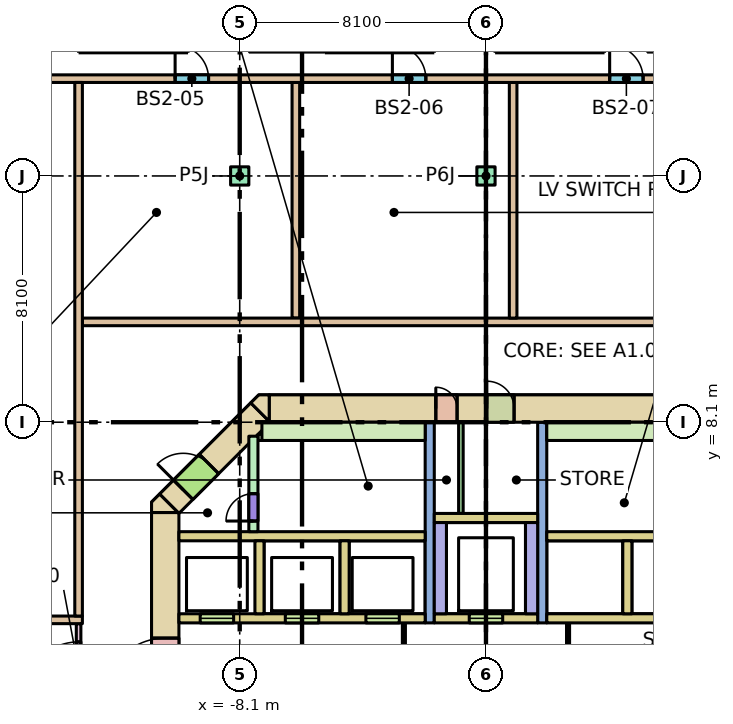
"""IFC4 building model, lengths in metres.
Left out: names, types, materials, properties, quantities, classifications, styles, units other than length and angle.
Written with IfcOpenShell. Run it as: python <this file> out.ifc"""

import sys

from ifc_helpers import new_model, si_unit, direction, frame, frame_2d, origin, origin_2d, place, context, subcontext, project, spatial, polyline, rectangle, outline, extrude, element, fill, save


model = new_model("IFC4")
c1 = context("Model", 3, precision=1e-05, world=origin(), true_north=direction((0.0, 1.0)))
c2 = subcontext(c1, "Body", "Model", "MODEL_VIEW")
j1 = project(units=[si_unit("LENGTHUNIT", "METRE"), si_unit("PLANEANGLEUNIT", "RADIAN")], contexts=[c1])
p1 = place(None, origin())
s1 = spatial("IfcSite", under=j1, at=p1, CompositionType="ELEMENT")
p2 = place(p1, origin())
s2 = spatial("IfcBuilding", under=s1, at=p2, CompositionType="ELEMENT")
p3 = place(p2, frame((0.0, 0.0, -7.2)))
s3 = spatial("IfcBuildingStorey", under=s2, at=p3, CompositionType="ELEMENT", Elevation=-7.2)
for number, where, z_axis, x_axis in (
    (1, (-8.1, 16.2, 0.0), (0.0, 0.0, 1.0), (1.0, 0.0, 0.0)),
    (2, (0.0, 16.2, 0.0), (0.0, 0.0, 1.0), (1.0, 0.0, 0.0)),
):
    element("IfcColumn", number, at=place(p3, frame(where, z_axis=z_axis, x_axis=x_axis)), inside=s3, PredefinedType="COLUMN", context=c2, shape_type="SweptSolid", body=[
        extrude(rectangle(XDim=0.6, YDim=0.6, at=origin_2d()), origin(), (0.0, 0.0, 1.0), 3.6),
    ])
p4 = place(p3, frame((-7.13, 8.55, -0.32), z_axis=(0.0, 0.0, 1.0), x_axis=(1.0, 0.0, 0.0)))
e3 = element("IfcWall", 3, at=p4, inside=s3, PredefinedType="SHEAR", context=c2, shape_type="SweptSolid", body=[
    extrude(rectangle(XDim=14.26, YDim=0.9, at=frame_2d((7.13, 0.0))), origin(), (0.0, 0.0, 1.0), 3.6),
])
p5 = place(p4, frame((5.48, 0.0, 0.32)))
e4 = element("IfcOpeningElement", 4, at=p5, cuts=e3, PredefinedType="OPENING", context=c2, shape_type="SweptSolid", body=[
    extrude(rectangle(XDim=0.7, YDim=2.1, at=frame_2d((0.35, 1.05))), frame((0.0, 0.46, 0.0), z_axis=(0.0, -1.0, 0.0), x_axis=(1.0, 0.0, 0.0)), (0.0, 0.0, 1.0), 0.92),
])
p6 = place(p4, frame((7.155, 0.0, 0.32)))
e5 = element("IfcOpeningElement", 5, at=p6, cuts=e3, PredefinedType="OPENING", context=c2, shape_type="SweptSolid", body=[
    extrude(rectangle(XDim=0.9, YDim=2.1, at=frame_2d((0.45, 1.05))), frame((0.0, 0.46, 0.0), z_axis=(0.0, -1.0, 0.0), x_axis=(1.0, 0.0, 0.0)), (0.0, 0.0, 1.0), 0.92),
])
p7 = place(p3, frame((-10.55, -5.13, -0.32), z_axis=(0.0, 0.0, 1.0), x_axis=(0.0, 1.0, 0.0)))
e6 = element("IfcWall", 6, at=p7, inside=s3, PredefinedType="SHEAR", context=c2, shape_type="SweptSolid", body=[
    extrude(rectangle(XDim=10.26, YDim=0.9, at=frame_2d((5.13, 0.0))), origin(), (0.0, 0.0, 1.0), 3.6),
])
p8 = place(p7, frame((4.13, 0.0, 0.32)))
e7 = element("IfcOpeningElement", 7, at=p8, cuts=e6, PredefinedType="OPENING", context=c2, shape_type="SweptSolid", body=[
    extrude(rectangle(XDim=2.0, YDim=2.1, at=frame_2d((1.0, 1.05))), frame((0.0, 0.46, 0.0), z_axis=(0.0, -1.0, 0.0), x_axis=(1.0, 0.0, 0.0)), (0.0, 0.0, 1.0), 0.92),
])
p9 = place(p3, frame((-10.418, 5.418, -0.32), z_axis=(0.0, 0.0, 1.0), x_axis=(0.707106781187, 0.707106781187, 0.0)))
e8 = element("IfcWall", 8, at=p9, inside=s3, PredefinedType="SHEAR", context=c2, shape_type="SweptSolid", body=[
    extrude(rectangle(XDim=4.243, YDim=0.9, at=frame_2d((2.121, 0.0))), origin(), (0.0, 0.0, 1.0), 3.6),
])
p10 = place(p9, frame((0.65, 0.0, 0.32)))
e9 = element("IfcOpeningElement", 9, at=p10, cuts=e8, PredefinedType="OPENING", context=c2, shape_type="SweptSolid", body=[
    extrude(rectangle(XDim=1.2, YDim=2.1, at=frame_2d((0.6, 1.05))), frame((0.0, 0.46, 0.0), z_axis=(0.0, -1.0, 0.0), x_axis=(1.0, 0.0, 0.0)), (0.0, 0.0, 1.0), 0.92),
])
p11 = place(p3, frame((0.0, 0.0, -0.32)))
e10 = element("IfcWall", 10, at=p11, inside=s3, PredefinedType="SHEAR", context=c2, shape_type="SweptSolid", body=[
    extrude(outline(polyline([(-10.736, 5.736), (-10.13, 5.13), (-11.0, 5.13), (-11.0, 5.473), (-10.736, 5.736)])), origin(), (0.0, 0.0, 1.0), 3.6),
])
p12 = place(p3, frame((0.0, 0.0, -0.32)))
e11 = element("IfcWall", 11, at=p12, inside=s3, PredefinedType="SHEAR", context=c2, shape_type="SweptSolid", body=[
    extrude(outline(polyline([(-7.473, 9.0), (-7.13, 9.0), (-7.13, 8.13), (-7.736, 8.736), (-7.473, 9.0)])), origin(), (0.0, 0.0, 1.0), 3.6),
])
for number, where, z_axis, x_axis in (
    (12, (-10.1, 4.35, 0.0), (0.0, 0.0, 1.0), (1.0, 0.0, 0.0)),
    (13, (2.0, 4.35, 0.0), (0.0, 0.0, 1.0), (1.0, 0.0, 0.0)),
):
    element("IfcWall", number, at=place(p3, frame(where, z_axis=z_axis, x_axis=x_axis)), inside=s3, PredefinedType="SOLIDWALL", context=c2, shape_type="SweptSolid", body=[
        extrude(rectangle(XDim=8.1, YDim=0.3, at=frame_2d((4.05, 0.0))), origin(), (0.0, 0.0, 1.0), 3.28),
    ])
p13 = place(p3, frame((-10.1, 1.65, 0.0), z_axis=(0.0, 0.0, 1.0), x_axis=(1.0, 0.0, 0.0)))
e14 = element("IfcWall", 14, at=p13, inside=s3, PredefinedType="SOLIDWALL", context=c2, shape_type="SweptSolid", body=[
    extrude(rectangle(XDim=8.1, YDim=0.3, at=frame_2d((4.05, 0.0))), origin(), (0.0, 0.0, 1.0), 3.28),
])
p14 = place(p13, frame((0.7, 0.0, 0.0)))
e15 = element("IfcOpeningElement", 15, at=p14, cuts=e14, PredefinedType="OPENING", context=c2, shape_type="SweptSolid", body=[
    extrude(rectangle(XDim=1.1, YDim=2.1, at=frame_2d((0.55, 1.05))), frame((0.0, 0.16, 0.0), z_axis=(0.0, -1.0, 0.0), x_axis=(1.0, 0.0, 0.0)), (0.0, 0.0, 1.0), 0.32),
])
p15 = place(p13, frame((3.5, 0.0, 0.0)))
e16 = element("IfcOpeningElement", 16, at=p15, cuts=e14, PredefinedType="OPENING", context=c2, shape_type="SweptSolid", body=[
    extrude(rectangle(XDim=1.1, YDim=2.1, at=frame_2d((0.55, 1.05))), frame((0.0, 0.16, 0.0), z_axis=(0.0, -1.0, 0.0), x_axis=(1.0, 0.0, 0.0)), (0.0, 0.0, 1.0), 0.32),
])
p16 = place(p13, frame((6.15, 0.0, 0.0)))
e17 = element("IfcOpeningElement", 17, at=p16, cuts=e14, PredefinedType="OPENING", context=c2, shape_type="SweptSolid", body=[
    extrude(rectangle(XDim=1.1, YDim=2.1, at=frame_2d((0.55, 1.05))), frame((0.0, 0.16, 0.0), z_axis=(0.0, -1.0, 0.0), x_axis=(1.0, 0.0, 0.0)), (0.0, 0.0, 1.0), 0.32),
])
p17 = place(p3, frame((2.0, 1.65, 0.0), z_axis=(0.0, 0.0, 1.0), x_axis=(1.0, 0.0, 0.0)))
e18 = element("IfcWall", 18, at=p17, inside=s3, PredefinedType="SOLIDWALL", context=c2, shape_type="SweptSolid", body=[
    extrude(rectangle(XDim=8.1, YDim=0.3, at=frame_2d((4.05, 0.0))), origin(), (0.0, 0.0, 1.0), 3.28),
])
for number, where, z_axis, x_axis in (
    (19, (-7.45, 1.8, 0.0), (0.0, 0.0, 1.0), (0.0, 1.0, 0.0)),
    (20, (-4.65, 1.8, 0.0), (0.0, 0.0, 1.0), (0.0, 1.0, 0.0)),
    (21, (4.65, 1.8, 0.0), (0.0, 0.0, 1.0), (0.0, 1.0, 0.0)),
):
    element("IfcWall", number, at=place(p3, frame(where, z_axis=z_axis, x_axis=x_axis)), inside=s3, PredefinedType="SOLIDWALL", context=c2, shape_type="SweptSolid", body=[
        extrude(rectangle(XDim=2.4, YDim=0.3, at=frame_2d((1.2, 0.0))), origin(), (0.0, 0.0, 1.0), 3.28),
    ])
for number, where, z_axis, x_axis in (
    (22, (-1.85, 1.5, 0.0), (0.0, 0.0, 1.0), (0.0, 1.0, 0.0)),
    (23, (1.85, 1.5, 0.0), (0.0, 0.0, 1.0), (0.0, 1.0, 0.0)),
):
    element("IfcWall", number, at=place(p3, frame(where, z_axis=z_axis, x_axis=x_axis)), inside=s3, PredefinedType="SHEAR", context=c2, shape_type="SweptSolid", body=[
        extrude(rectangle(XDim=6.6, YDim=0.3, at=frame_2d((3.3, 0.0))), origin(), (0.0, 0.0, 1.0), 3.28),
    ])
p18 = place(p3, frame((-1.7, 1.65, 0.0), z_axis=(0.0, 0.0, 1.0), x_axis=(1.0, 0.0, 0.0)))
e24 = element("IfcWall", 24, at=p18, inside=s3, PredefinedType="SOLIDWALL", context=c2, shape_type="SweptSolid", body=[
    extrude(rectangle(XDim=3.4, YDim=0.3, at=frame_2d((1.7, 0.0))), origin(), (0.0, 0.0, 1.0), 3.28),
])
p19 = place(p18, frame((1.15, 0.0, 0.0)))
e25 = element("IfcOpeningElement", 25, at=p19, cuts=e24, PredefinedType="OPENING", context=c2, shape_type="SweptSolid", body=[
    extrude(rectangle(XDim=1.1, YDim=2.1, at=frame_2d((0.55, 1.05))), frame((0.0, 0.16, 0.0), z_axis=(0.0, -1.0, 0.0), x_axis=(1.0, 0.0, 0.0)), (0.0, 0.0, 1.0), 0.32),
])
for number, where, z_axis, x_axis in (
    (26, (-1.5, 1.8, 0.0), (0.0, 0.0, 1.0), (0.0, 1.0, 0.0)),
    (27, (1.5, 1.8, 0.0), (0.0, 0.0, 1.0), (0.0, 1.0, 0.0)),
):
    element("IfcWall", number, at=place(p3, frame(where, z_axis=z_axis, x_axis=x_axis)), inside=s3, PredefinedType="SOLIDWALL", context=c2, shape_type="SweptSolid", body=[
        extrude(rectangle(XDim=3.0, YDim=0.4, at=frame_2d((1.5, 0.0))), origin(), (0.0, 0.0, 1.0), 3.28),
    ])
p20 = place(p3, frame((-1.7, 4.95, 0.0), z_axis=(0.0, 0.0, 1.0), x_axis=(1.0, 0.0, 0.0)))
e28 = element("IfcWall", 28, at=p20, inside=s3, PredefinedType="SOLIDWALL", context=c2, shape_type="SweptSolid", body=[
    extrude(rectangle(XDim=3.4, YDim=0.3, at=frame_2d((1.7, 0.0))), origin(), (0.0, 0.0, 1.0), 3.28),
])
p21 = place(p3, frame((-7.65, 4.5, 0.0), z_axis=(0.0, 0.0, 1.0), x_axis=(0.0, 1.0, 0.0)))
e29 = element("IfcWall", 29, at=p21, inside=s3, PredefinedType="SHEAR", context=c2, shape_type="SweptSolid", body=[
    extrude(rectangle(XDim=3.14, YDim=0.3, at=frame_2d((1.57, 0.0))), origin(), (0.0, 0.0, 1.0), 3.28),
])
p22 = place(p21, frame((0.35, 0.0, 0.0)))
e30 = element("IfcOpeningElement", 30, at=p22, cuts=e29, PredefinedType="OPENING", context=c2, shape_type="SweptSolid", body=[
    extrude(rectangle(XDim=0.9, YDim=2.1, at=frame_2d((0.45, 1.05))), frame((0.0, 0.16, 0.0), z_axis=(0.0, -1.0, 0.0), x_axis=(1.0, 0.0, 0.0)), (0.0, 0.0, 1.0), 0.32),
])
for number, where, z_axis, x_axis in (
    (31, (-7.37, 7.8, 0.0), (0.0, 0.0, 1.0), (1.0, 0.0, 0.0)),
    (32, (2.0, 7.8, 0.0), (0.0, 0.0, 1.0), (1.0, 0.0, 0.0)),
):
    element("IfcWall", number, at=place(p3, frame(where, z_axis=z_axis, x_axis=x_axis)), inside=s3, PredefinedType="SHEAR", context=c2, shape_type="SweptSolid", body=[
        extrude(rectangle(XDim=5.37, YDim=0.6, at=frame_2d((2.685, 0.0))), origin(), (0.0, 0.0, 1.0), 3.28),
    ])
p23 = place(p3, frame((-7.5, 7.6, 0.0), z_axis=(0.0, 0.0, 1.0), x_axis=(1.0, 0.0, 0.0)))
e33 = element("IfcWall", 33, at=p23, inside=s3, PredefinedType="SHEAR", context=c2, shape_type="SweptSolid", body=[
    extrude(rectangle(XDim=0.6, YDim=0.2, at=frame_2d((0.3, 0.0))), origin(), (0.0, 0.0, 1.0), 3.28),
])
p24 = place(p3, frame((-2.7, -1.5, 0.0), z_axis=(0.0, 0.0, 1.0), x_axis=(0.0, 1.0, 0.0)))
e34 = element("IfcWall", 34, at=p24, inside=s3, PredefinedType="PARTITIONING", context=c2, shape_type="SweptSolid", body=[
    extrude(rectangle(XDim=3.0, YDim=0.1, at=frame_2d((1.5, 0.0))), origin(), (0.0, 0.0, 1.0), 3.28),
])
p25 = place(p24, frame((0.9, 0.0, 0.0)))
e35 = element("IfcOpeningElement", 35, at=p25, cuts=e34, PredefinedType="OPENING", context=c2, shape_type="SweptSolid", body=[
    extrude(rectangle(XDim=1.2, YDim=2.1, at=frame_2d((0.6, 1.05))), frame((0.0, 0.06, 0.0), z_axis=(0.0, -1.0, 0.0), x_axis=(1.0, 0.0, 0.0)), (0.0, 0.0, 1.0), 0.12),
])
p26 = place(p3, frame((2.7, -1.5, 0.0), z_axis=(0.0, 0.0, 1.0), x_axis=(0.0, 1.0, 0.0)))
e36 = element("IfcWall", 36, at=p26, inside=s3, PredefinedType="PARTITIONING", context=c2, shape_type="SweptSolid", body=[
    extrude(rectangle(XDim=3.0, YDim=0.1, at=frame_2d((1.5, 0.0))), origin(), (0.0, 0.0, 1.0), 3.28),
])
p27 = place(p26, frame((0.9, 0.0, 0.0)))
e37 = element("IfcOpeningElement", 37, at=p27, cuts=e36, PredefinedType="OPENING", context=c2, shape_type="SweptSolid", body=[
    extrude(rectangle(XDim=1.2, YDim=2.1, at=frame_2d((0.6, 1.05))), frame((0.0, 0.06, 0.0), z_axis=(0.0, -1.0, 0.0), x_axis=(1.0, 0.0, 0.0)), (0.0, 0.0, 1.0), 0.12),
])
p28 = place(p3, frame((-0.825, 5.1, 0.0), z_axis=(0.0, 0.0, 1.0), x_axis=(0.0, 1.0, 0.0)))
e38 = element("IfcWall", 38, at=p28, inside=s3, PredefinedType="PARTITIONING", context=c2, shape_type="SweptSolid", body=[
    extrude(rectangle(XDim=3.0, YDim=0.15, at=frame_2d((1.5, 0.0))), origin(), (0.0, 0.0, 1.0), 3.28),
])
p29 = place(p3, frame((-6.253, 11.525, 0.0), z_axis=(0.0, 0.0, 1.0), x_axis=(0.0, 1.0, 0.0)))
e39 = element("IfcWall", 39, at=p29, inside=s3, PredefinedType="PARTITIONING", context=c2, shape_type="SweptSolid", body=[
    extrude(rectangle(XDim=7.75, YDim=0.25, at=frame_2d((3.875, 0.0))), origin(), (0.0, 0.0, 1.0), 3.28),
])
p30 = place(p3, frame((-13.275, 11.4, 0.0), z_axis=(0.0, 0.0, 1.0), x_axis=(1.0, 0.0, 0.0)))
e40 = element("IfcWall", 40, at=p30, inside=s3, PredefinedType="PARTITIONING", context=c2, shape_type="SweptSolid", body=[
    extrude(rectangle(XDim=34.55, YDim=0.25, at=frame_2d((17.275, 0.0))), origin(), (0.0, 0.0, 1.0), 3.28),
])
p31 = place(p3, frame((0.893, 11.525, 0.0), z_axis=(0.0, 0.0, 1.0), x_axis=(0.0, 1.0, 0.0)))
e41 = element("IfcWall", 41, at=p31, inside=s3, PredefinedType="PARTITIONING", context=c2, shape_type="SweptSolid", body=[
    extrude(rectangle(XDim=7.75, YDim=0.25, at=frame_2d((3.875, 0.0))), origin(), (0.0, 0.0, 1.0), 3.28),
])
p32 = place(p3, frame((-17.778, 19.4, 0.0), z_axis=(0.0, 0.0, 1.0), x_axis=(1.0, 0.0, 0.0)))
e42 = element("IfcWall", 42, at=p32, inside=s3, PredefinedType="PARTITIONING", context=c2, shape_type="SweptSolid", body=[
    extrude(rectangle(XDim=35.557, YDim=0.25, at=frame_2d((17.778, 0.0))), origin(), (0.0, 0.0, 1.0), 3.28),
])
p33 = place(p32, frame((7.553, 0.0, 0.0)))
e43 = element("IfcOpeningElement", 43, at=p33, cuts=e42, PredefinedType="OPENING", context=c2, shape_type="SweptSolid", body=[
    extrude(rectangle(XDim=1.1, YDim=2.1, at=frame_2d((0.55, 1.05))), frame((0.0, 0.135, 0.0), z_axis=(0.0, -1.0, 0.0), x_axis=(1.0, 0.0, 0.0)), (0.0, 0.0, 1.0), 0.27),
])
p34 = place(p32, frame((14.7, 0.0, 0.0)))
e44 = element("IfcOpeningElement", 44, at=p34, cuts=e42, PredefinedType="OPENING", context=c2, shape_type="SweptSolid", body=[
    extrude(rectangle(XDim=1.1, YDim=2.1, at=frame_2d((0.55, 1.05))), frame((0.0, 0.135, 0.0), z_axis=(0.0, -1.0, 0.0), x_axis=(1.0, 0.0, 0.0)), (0.0, 0.0, 1.0), 0.27),
])
p35 = place(p32, frame((21.847, 0.0, 0.0)))
e45 = element("IfcOpeningElement", 45, at=p35, cuts=e42, PredefinedType="OPENING", context=c2, shape_type="SweptSolid", body=[
    extrude(rectangle(XDim=1.1, YDim=2.1, at=frame_2d((0.55, 1.05))), frame((0.0, 0.135, 0.0), z_axis=(0.0, -1.0, 0.0), x_axis=(1.0, 0.0, 0.0)), (0.0, 0.0, 1.0), 0.27),
])
p36 = place(p32, frame((30.193, 0.0, 0.0)))
e46 = element("IfcOpeningElement", 46, at=p36, cuts=e42, PredefinedType="OPENING", context=c2, shape_type="SweptSolid", body=[
    extrude(rectangle(XDim=1.1, YDim=2.1, at=frame_2d((0.55, 1.05))), frame((0.0, 0.135, 0.0), z_axis=(0.0, -1.0, 0.0), x_axis=(1.0, 0.0, 0.0)), (0.0, 0.0, 1.0), 0.27),
])
p37 = place(p3, frame((-13.4, -1.475, 0.0), z_axis=(0.0, 0.0, 1.0), x_axis=(0.0, 1.0, 0.0)))
e47 = element("IfcWall", 47, at=p37, inside=s3, PredefinedType="PARTITIONING", context=c2, shape_type="SweptSolid", body=[
    extrude(rectangle(XDim=2.95, YDim=0.15, at=frame_2d((1.475, 0.0))), origin(), (0.0, 0.0, 1.0), 3.28),
])
p38 = place(p37, frame((0.55, 0.0, 0.0)))
e48 = element("IfcOpeningElement", 48, at=p38, cuts=e47, PredefinedType="OPENING", context=c2, shape_type="SweptSolid", body=[
    extrude(rectangle(XDim=1.8, YDim=2.4, at=frame_2d((0.9, 1.2))), frame((0.0, 0.085, 0.0), z_axis=(0.0, -1.0, 0.0), x_axis=(1.0, 0.0, 0.0)), (0.0, 0.0, 1.0), 0.17),
])
p39 = place(p3, frame((-23.725, 1.6, 0.0), z_axis=(0.0, 0.0, 1.0), x_axis=(1.0, 0.0, 0.0)))
e49 = element("IfcWall", 49, at=p39, inside=s3, PredefinedType="PARTITIONING", context=c2, shape_type="SweptSolid", body=[
    extrude(rectangle(XDim=10.45, YDim=0.25, at=frame_2d((5.225, 0.0))), origin(), (0.0, 0.0, 1.0), 3.28),
])
p40 = place(p3, frame((-13.4, 1.725, 0.0), z_axis=(0.0, 0.0, 1.0), x_axis=(0.0, 1.0, 0.0)))
e50 = element("IfcWall", 50, at=p40, inside=s3, PredefinedType="PARTITIONING", context=c2, shape_type="SweptSolid", body=[
    extrude(rectangle(XDim=17.55, YDim=0.25, at=frame_2d((8.775, 0.0))), origin(), (0.0, 0.0, 1.0), 3.28),
])
p41 = place(p14, origin())
e51 = element("IfcDoor", 51, at=p41, inside=s3, OperationType="DOUBLE_DOOR_SLIDING", PredefinedType="DOOR", context=c2, shape_type="SweptSolid", body=[
    extrude(rectangle(XDim=1.1, YDim=2.1, at=frame_2d((0.55, 1.05))), frame((0.0, 0.025, 0.0), z_axis=(0.0, -1.0, 0.0), x_axis=(1.0, 0.0, 0.0)), (0.0, 0.0, 1.0), 0.05),
])
fill(e15, e51)
p42 = place(p15, origin())
e52 = element("IfcDoor", 52, at=p42, inside=s3, OperationType="DOUBLE_DOOR_SLIDING", PredefinedType="DOOR", context=c2, shape_type="SweptSolid", body=[
    extrude(rectangle(XDim=1.1, YDim=2.1, at=frame_2d((0.55, 1.05))), frame((0.0, 0.025, 0.0), z_axis=(0.0, -1.0, 0.0), x_axis=(1.0, 0.0, 0.0)), (0.0, 0.0, 1.0), 0.05),
])
fill(e16, e52)
p43 = place(p16, origin())
e53 = element("IfcDoor", 53, at=p43, inside=s3, OperationType="DOUBLE_DOOR_SLIDING", PredefinedType="DOOR", context=c2, shape_type="SweptSolid", body=[
    extrude(rectangle(XDim=1.1, YDim=2.1, at=frame_2d((0.55, 1.05))), frame((0.0, 0.025, 0.0), z_axis=(0.0, -1.0, 0.0), x_axis=(1.0, 0.0, 0.0)), (0.0, 0.0, 1.0), 0.05),
])
fill(e17, e53)
p44 = place(p19, origin())
e54 = element("IfcDoor", 54, at=p44, inside=s3, OperationType="DOUBLE_DOOR_SLIDING", PredefinedType="DOOR", context=c2, shape_type="SweptSolid", body=[
    extrude(rectangle(XDim=1.1, YDim=2.1, at=frame_2d((0.55, 1.05))), frame((0.0, 0.025, 0.0), z_axis=(0.0, -1.0, 0.0), x_axis=(1.0, 0.0, 0.0)), (0.0, 0.0, 1.0), 0.05),
])
fill(e25, e54)
p45 = place(p22, origin())
e55 = element("IfcDoor", 55, at=p45, inside=s3, OperationType="SINGLE_SWING_LEFT", PredefinedType="DOOR", context=c2, shape_type="SweptSolid", body=[
    extrude(rectangle(XDim=0.9, YDim=2.1, at=frame_2d((0.45, 1.05))), frame((0.0, 0.025, 0.0), z_axis=(0.0, -1.0, 0.0), x_axis=(1.0, 0.0, 0.0)), (0.0, 0.0, 1.0), 0.05),
])
fill(e30, e55)
p46 = place(p10, origin())
e56 = element("IfcDoor", 56, at=p46, inside=s3, OperationType="SINGLE_SWING_LEFT", PredefinedType="DOOR", context=c2, shape_type="SweptSolid", body=[
    extrude(rectangle(XDim=1.2, YDim=2.1, at=frame_2d((0.6, 1.05))), frame((0.0, 0.025, 0.0), z_axis=(0.0, -1.0, 0.0), x_axis=(1.0, 0.0, 0.0)), (0.0, 0.0, 1.0), 0.05),
])
fill(e9, e56)
p47 = place(p8, origin())
e57 = element("IfcDoor", 57, at=p47, inside=s3, OperationType="DOUBLE_DOOR_SINGLE_SWING", PredefinedType="DOOR", context=c2, shape_type="SweptSolid", body=[
    extrude(rectangle(XDim=2.0, YDim=2.1, at=frame_2d((1.0, 1.05))), frame((0.0, 0.025, 0.0), z_axis=(0.0, -1.0, 0.0), x_axis=(1.0, 0.0, 0.0)), (0.0, 0.0, 1.0), 0.05),
])
fill(e7, e57)
p48 = place(p5, origin())
e58 = element("IfcDoor", 58, at=p48, inside=s3, OperationType="SINGLE_SWING_LEFT", PredefinedType="DOOR", context=c2, shape_type="SweptSolid", body=[
    extrude(rectangle(XDim=0.7, YDim=2.1, at=frame_2d((0.35, 1.05))), frame((0.0, 0.025, 0.0), z_axis=(0.0, -1.0, 0.0), x_axis=(1.0, 0.0, 0.0)), (0.0, 0.0, 1.0), 0.05),
])
fill(e4, e58)
p49 = place(p6, origin())
e59 = element("IfcDoor", 59, at=p49, inside=s3, OperationType="SINGLE_SWING_LEFT", PredefinedType="DOOR", context=c2, shape_type="SweptSolid", body=[
    extrude(rectangle(XDim=0.9, YDim=2.1, at=frame_2d((0.45, 1.05))), frame((0.0, 0.025, 0.0), z_axis=(0.0, -1.0, 0.0), x_axis=(1.0, 0.0, 0.0)), (0.0, 0.0, 1.0), 0.05),
])
fill(e5, e59)
p50 = place(p33, origin())
e60 = element("IfcDoor", 60, at=p50, inside=s3, OperationType="SINGLE_SWING_LEFT", PredefinedType="DOOR", context=c2, shape_type="SweptSolid", body=[
    extrude(rectangle(XDim=1.1, YDim=2.1, at=frame_2d((0.55, 1.05))), frame((0.0, 0.025, 0.0), z_axis=(0.0, -1.0, 0.0), x_axis=(1.0, 0.0, 0.0)), (0.0, 0.0, 1.0), 0.05),
])
fill(e43, e60)
p51 = place(p34, origin())
e61 = element("IfcDoor", 61, at=p51, inside=s3, OperationType="SINGLE_SWING_LEFT", PredefinedType="DOOR", context=c2, shape_type="SweptSolid", body=[
    extrude(rectangle(XDim=1.1, YDim=2.1, at=frame_2d((0.55, 1.05))), frame((0.0, 0.025, 0.0), z_axis=(0.0, -1.0, 0.0), x_axis=(1.0, 0.0, 0.0)), (0.0, 0.0, 1.0), 0.05),
])
fill(e44, e61)
p52 = place(p35, origin())
e62 = element("IfcDoor", 62, at=p52, inside=s3, OperationType="SINGLE_SWING_LEFT", PredefinedType="DOOR", context=c2, shape_type="SweptSolid", body=[
    extrude(rectangle(XDim=1.1, YDim=2.1, at=frame_2d((0.55, 1.05))), frame((0.0, 0.025, 0.0), z_axis=(0.0, -1.0, 0.0), x_axis=(1.0, 0.0, 0.0)), (0.0, 0.0, 1.0), 0.05),
])
fill(e45, e62)
p53 = place(p38, origin())
e63 = element("IfcDoor", 63, at=p53, inside=s3, OperationType="SINGLE_SWING_LEFT", PredefinedType="DOOR", context=c2, shape_type="SweptSolid", body=[
    extrude(rectangle(XDim=1.8, YDim=2.4, at=frame_2d((0.9, 1.2))), frame((0.0, 0.025, 0.0), z_axis=(0.0, -1.0, 0.0), x_axis=(1.0, 0.0, 0.0)), (0.0, 0.0, 1.0), 0.05),
])
fill(e48, e63)
save(model, sys.argv[1])
